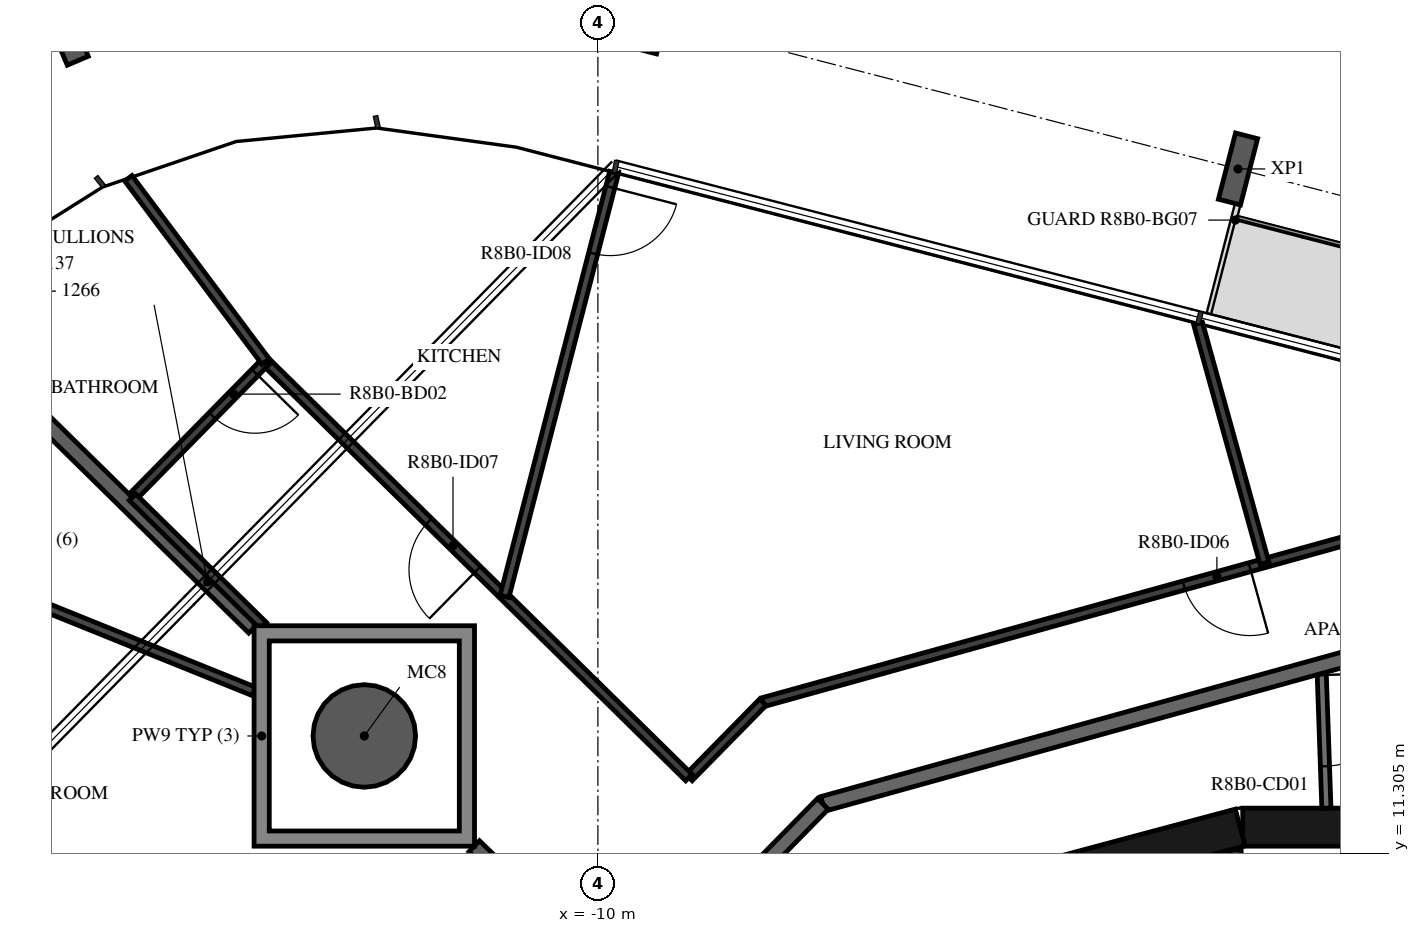
"""IFC4 building model, lengths in metres.
Left out: names, types, materials, properties, quantities, classifications, styles, units other than length and angle.
Written with IfcOpenShell. Run it as: python <this file> out.ifc"""

import sys

from ifc_helpers import new_model, si_unit, direction, frame, frame_2d, origin, origin_2d, place, context, subcontext, project, spatial, polyline, rectangle, hollow_circle, i_section, outline, extrude, element, fill, save


model = new_model("IFC4")
c1 = context("Model", 3, precision=1e-05, world=origin(), true_north=direction((0.0, 1.0)))
c2 = subcontext(c1, "Body", "Model", "MODEL_VIEW")
j1 = project(units=[si_unit("LENGTHUNIT", "METRE"), si_unit("PLANEANGLEUNIT", "RADIAN")], contexts=[c1])
p1 = place(None, origin())
s1 = spatial("IfcSite", under=j1, at=p1, CompositionType="ELEMENT")
p2 = place(p1, origin())
s2 = spatial("IfcBuilding", under=s1, at=p2, CompositionType="ELEMENT")
p3 = place(p2, frame((0.0, 0.0, 312.2)))
s3 = spatial("IfcBuildingStorey", under=s2, at=p3, CompositionType="ELEMENT", Elevation=312.2)
p4 = place(p3, frame((-13.073, 12.847, -0.38), z_axis=(0.0, 0.0, 1.0), x_axis=(1.0, 0.0, 0.0)))
e1 = element("IfcColumn", 1, at=p4, inside=s3, PredefinedType="COLUMN", context=c2, shape_type="SweptSolid", body=[
    extrude(hollow_circle(Radius=0.675, WallThickness=0.03, at=origin_2d()), origin(), (0.0, 0.0, 1.0), 3.5),
])
for number, where, z_axis, x_axis in (
    (2, (-1.579, 20.307, -0.38), (0.0, 0.0, 1.0), (0.968, -0.25, 0.0)),
    (3, (-9.261, 22.293, -0.38), (0.0, 0.0, 1.0), (0.968, -0.25, 0.0)),
    (4, (-17.019, 22.145, -0.38), (0.0, 0.0, 1.0), (0.921, 0.391, 0.0)),
):
    element("IfcColumn", number, at=place(p3, frame(where, z_axis=z_axis, x_axis=x_axis)), inside=s3, PredefinedType="COLUMN", context=c2, shape_type="SweptSolid", body=[
        extrude(i_section(OverallWidth=0.3, OverallDepth=0.9, WebThickness=0.019, FlangeThickness=0.035, FilletRadius=0.03, at=origin_2d()), origin(), (0.0, 0.0, 1.0), 3.5),
    ])
for number, where, z_axis, x_axis in (
    (5, (1.516, 11.647, 0.0), (0.0, 0.0, 1.0), (-1.0, 0.0, 0.0)),
    (6, (-1.55, 11.643, 0.0), (0.0, 0.0, 1.0), (-0.966, -0.259, 0.0)),
):
    element("IfcWall", number, at=place(p3, frame(where, z_axis=z_axis, x_axis=x_axis)), inside=s3, PredefinedType="SHEAR", context=c2, shape_type="SweptSolid", body=[
        extrude(rectangle(XDim=3.033, YDim=0.5, at=frame_2d((1.516, 0.0))), origin(), (0.0, 0.0, 1.0), 3.12),
    ])
p5 = place(p3, frame((-1.555, 8.99, 0.0), z_axis=(0.0, 0.0, 1.0), x_axis=(-0.024125549686, 0.999708936567, 0.0)))
e7 = element("IfcWall", 7, at=p5, inside=s3, PredefinedType="PARTITIONING", context=c2, shape_type="SweptSolid", body=[
    extrude(rectangle(XDim=2.358, YDim=0.15, at=frame_2d((1.179, 0.0))), origin(), (0.0, 0.0, 1.0), 3.12),
])
p6 = place(p5, frame((0.729, 0.0, 0.0)))
e8 = element("IfcOpeningElement", 8, at=p6, cuts=e7, PredefinedType="OPENING", context=c2, shape_type="SweptSolid", body=[
    extrude(rectangle(XDim=0.9, YDim=2.1, at=frame_2d((0.45, 1.05))), frame((0.0, 0.085, 0.0), z_axis=(0.0, -1.0, 0.0), x_axis=(1.0, 0.0, 0.0)), (0.0, 0.0, 1.0), 0.17),
])
p7 = place(p3, frame((-0.481, 13.772, 0.0), z_axis=(0.0, 0.0, 1.0), x_axis=(0.034870071203, -0.999391854146, 0.0)))
e9 = element("IfcWall", 9, at=p7, inside=s3, PredefinedType="PARTITIONING", context=c2, shape_type="SweptSolid", body=[
    extrude(rectangle(XDim=1.876, YDim=0.12, at=frame_2d((0.938, 0.0))), origin(), (0.0, 0.0, 1.0), 3.12),
])
p8 = place(p7, frame((0.125, 0.0, 0.0)))
e10 = element("IfcOpeningElement", 10, at=p8, cuts=e9, PredefinedType="OPENING", context=c2, shape_type="SweptSolid", body=[
    extrude(rectangle(XDim=1.2, YDim=2.1, at=frame_2d((0.6, 1.05))), frame((0.0, 0.07, 0.0), z_axis=(0.0, -1.0, 0.0), x_axis=(1.0, 0.0, 0.0)), (0.0, 0.0, 1.0), 0.14),
])
p9 = place(p3, frame((-0.121, 13.872, 0.0), z_axis=(0.0, 0.0, 1.0), x_axis=(-0.963625960674, -0.267254575108, 0.0)))
e11 = element("IfcWall", 11, at=p9, inside=s3, PredefinedType="STANDARD", context=c2, shape_type="SweptSolid", body=[
    extrude(rectangle(XDim=7.181, YDim=0.2, at=frame_2d((3.591, 0.0))), origin(), (0.0, 0.0, 1.0), 3.12),
])
p10 = place(p3, frame((-7.041, 11.953, 0.0), z_axis=(0.0, 0.0, 1.0), x_axis=(-0.70090916255, -0.713250549143, 0.0)))
e12 = element("IfcWall", 12, at=p10, inside=s3, PredefinedType="STANDARD", context=c2, shape_type="SweptSolid", body=[
    extrude(rectangle(XDim=7.181, YDim=0.2, at=frame_2d((3.59, 0.0))), origin(), (0.0, 0.0, 1.0), 3.12),
])
p11 = place(p10, frame((3.791, 0.0, 0.0)))
e13 = element("IfcOpeningElement", 13, at=p11, cuts=e12, PredefinedType="OPENING", context=c2, shape_type="SweptSolid", body=[
    extrude(rectangle(XDim=1.0, YDim=2.1, at=frame_2d((0.5, 1.05))), frame((0.0, 0.11, 0.0), z_axis=(0.0, -1.0, 0.0), x_axis=(1.0, 0.0, 0.0)), (0.0, 0.0, 1.0), 0.22),
])
p12 = place(p3, frame((-11.627, 11.396, 0.0), z_axis=(0.0, 0.0, 1.0), x_axis=(0.718328882961, -0.695703683981, 0.0)))
e14 = element("IfcWall", 14, at=p12, inside=s3, PredefinedType="STANDARD", context=c2, shape_type="SweptSolid", body=[
    extrude(rectangle(XDim=2.881, YDim=0.2, at=frame_2d((1.44, 0.0))), origin(), (0.0, 0.0, 1.0), 3.12),
])
p13 = place(p3, frame((-18.741, 18.417, 0.0), z_axis=(0.0, 0.0, 1.0), x_axis=(0.713252414586, -0.700907264256, 0.0)))
e15 = element("IfcWall", 15, at=p13, inside=s3, PredefinedType="STANDARD", context=c2, shape_type="SweptSolid", body=[
    extrude(rectangle(XDim=5.913, YDim=0.2, at=frame_2d((2.957, 0.0))), origin(), (0.0, 0.0, 1.0), 3.12),
])
p14 = place(p3, frame((-0.135, 15.425, 0.0), z_axis=(0.0, 0.0, 1.0), x_axis=(-0.963633899075, -0.267225950373, 0.0)))
e16 = element("IfcWall", 16, at=p14, inside=s3, PredefinedType="PARTITIONING", context=c2, shape_type="SweptSolid", body=[
    extrude(rectangle(XDim=7.985, YDim=0.12, at=frame_2d((3.992, 0.0))), origin(), (0.0, 0.0, 1.0), 3.12),
])
p15 = place(p14, frame((1.337, 0.0, 0.0)))
e17 = element("IfcOpeningElement", 17, at=p15, cuts=e16, PredefinedType="OPENING", context=c2, shape_type="SweptSolid", body=[
    extrude(rectangle(XDim=0.9, YDim=2.1, at=frame_2d((0.45, 1.05))), frame((0.0, 0.07, 0.0), z_axis=(0.0, -1.0, 0.0), x_axis=(1.0, 0.0, 0.0)), (0.0, 0.0, 1.0), 0.14),
])
p16 = place(p3, frame((-7.829, 13.291, 0.0), z_axis=(0.0, 0.0, 1.0), x_axis=(-0.700840583087, -0.713317935494, 0.0)))
e18 = element("IfcWall", 18, at=p16, inside=s3, PredefinedType="PARTITIONING", context=c2, shape_type="SweptSolid", body=[
    extrude(rectangle(XDim=1.389, YDim=0.12, at=frame_2d((0.695, 0.0))), origin(), (0.0, 0.0, 1.0), 3.12),
])
p17 = place(p3, frame((-8.803, 12.3, 0.0), z_axis=(0.0, 0.0, 1.0), x_axis=(-0.713240430861, 0.700919458844, 0.0)))
e19 = element("IfcWall", 19, at=p17, inside=s3, PredefinedType="PARTITIONING", context=c2, shape_type="SweptSolid", body=[
    extrude(rectangle(XDim=7.807, YDim=0.12, at=frame_2d((3.904, 0.0))), origin(), (0.0, 0.0, 1.0), 3.12),
])
p18 = place(p17, frame((3.901, 0.0, 0.0)))
e20 = element("IfcOpeningElement", 20, at=p18, cuts=e19, PredefinedType="OPENING", context=c2, shape_type="SweptSolid", body=[
    extrude(rectangle(XDim=0.9, YDim=2.1, at=frame_2d((0.45, 1.05))), frame((0.0, 0.07, 0.0), z_axis=(0.0, -1.0, 0.0), x_axis=(1.0, 0.0, 0.0)), (0.0, 0.0, 1.0), 0.14),
])
p19 = place(p3, frame((-14.371, 17.772, 0.0), z_axis=(0.0, 0.0, 1.0), x_axis=(-0.700928101034, -0.713231937859, 0.0)))
e21 = element("IfcWall", 21, at=p19, inside=s3, PredefinedType="PARTITIONING", context=c2, shape_type="SweptSolid", body=[
    extrude(rectangle(XDim=2.5, YDim=0.12, at=frame_2d((1.25, 0.0))), origin(), (0.0, 0.0, 1.0), 3.12),
])
p20 = place(p19, frame((0.2, 0.0, 0.0)))
e22 = element("IfcOpeningElement", 22, at=p20, cuts=e21, PredefinedType="OPENING", context=c2, shape_type="SweptSolid", body=[
    extrude(rectangle(XDim=0.8, YDim=2.1, at=frame_2d((0.4, 1.05))), frame((0.0, 0.07, 0.0), z_axis=(0.0, -1.0, 0.0), x_axis=(1.0, 0.0, 0.0)), (0.0, 0.0, 1.0), 0.14),
])
p21 = place(p3, frame((-16.124, 15.989, 0.0), z_axis=(0.0, 0.0, 1.0), x_axis=(0.713298294795, -0.700860572898, 0.0)))
e23 = element("IfcWall", 23, at=p21, inside=s3, PredefinedType="PARTITIONING", context=c2, shape_type="SweptSolid", body=[
    extrude(rectangle(XDim=2.414, YDim=0.12, at=frame_2d((1.207, 0.0))), origin(), (0.0, 0.0, 1.0), 3.12),
])
p22 = place(p3, frame((-2.104, 18.273, 0.0), z_axis=(0.0, 0.0, 1.0), x_axis=(0.267251230405, -0.963626888296, 0.0)))
e24 = element("IfcWall", 24, at=p22, inside=s3, PredefinedType="PARTITIONING", context=c2, shape_type="SweptSolid", body=[
    extrude(rectangle(XDim=3.271, YDim=0.12, at=frame_2d((1.636, 0.0))), origin(), (0.0, 0.0, 1.0), 3.12),
])
p23 = place(p3, frame((-9.787, 20.26, 0.0), z_axis=(0.0, 0.0, 1.0), x_axis=(-0.250397207818, -0.968143191019, 0.0)))
e25 = element("IfcWall", 25, at=p23, inside=s3, PredefinedType="PARTITIONING", context=c2, shape_type="SweptSolid", body=[
    extrude(rectangle(XDim=5.76, YDim=0.12, at=frame_2d((2.88, 0.0))), origin(), (0.0, 0.0, 1.0), 2.73),
])
p24 = place(p23, frame((0.2, 0.0, 0.0)))
e26 = element("IfcOpeningElement", 26, at=p24, cuts=e25, PredefinedType="OPENING", context=c2, shape_type="SweptSolid", body=[
    extrude(rectangle(XDim=0.9, YDim=2.1, at=frame_2d((0.45, 1.05))), frame((0.0, 0.07, 0.0), z_axis=(0.0, -1.0, 0.0), x_axis=(1.0, 0.0, 0.0)), (0.0, 0.0, 1.0), 0.14),
])
p25 = place(p3, frame((-16.177, 20.184, 0.0), z_axis=(0.0, 0.0, 1.0), x_axis=(0.599546131574, -0.800340200237, 0.0)))
e27 = element("IfcWall", 27, at=p25, inside=s3, PredefinedType="PARTITIONING", context=c2, shape_type="SweptSolid", body=[
    extrude(rectangle(XDim=3.013, YDim=0.12, at=frame_2d((1.506, 0.0))), origin(), (0.0, 0.0, 1.0), 2.73),
])
p26 = place(p3, frame((-20.46, 15.831, 0.0), z_axis=(0.0, 0.0, 1.0), x_axis=(0.927230380144, -0.374491417977, 0.0)))
e28 = element("IfcWall", 28, at=p26, inside=s3, PredefinedType="PARTITIONING", context=c2, shape_type="SweptSolid", body=[
    extrude(rectangle(XDim=6.403, YDim=0.12, at=frame_2d((3.202, 0.0))), origin(), (0.0, 0.0, 1.0), 2.73),
])
p27 = place(p26, frame((0.2, 0.0, 0.0)))
e29 = element("IfcOpeningElement", 29, at=p27, cuts=e28, PredefinedType="OPENING", context=c2, shape_type="SweptSolid", body=[
    extrude(rectangle(XDim=0.9, YDim=2.1, at=frame_2d((0.45, 1.05))), frame((0.0, 0.07, 0.0), z_axis=(0.0, -1.0, 0.0), x_axis=(1.0, 0.0, 0.0)), (0.0, 0.0, 1.0), 0.14),
])
p28 = place(p3, frame((-21.051, 12.76, 0.0), z_axis=(0.0, 0.0, 1.0), x_axis=(0.826728647395, -0.562600874134, 0.0)))
e30 = element("IfcWall", 30, at=p28, inside=s3, PredefinedType="PARTITIONING", context=c2, shape_type="SweptSolid", body=[
    extrude(rectangle(XDim=7.002, YDim=0.12, at=frame_2d((3.501, 0.0))), origin(), (0.0, 0.0, 1.0), 3.12),
])
p29 = place(p3, origin())
e31 = element("IfcWall", 31, at=p29, inside=s3, PredefinedType="STANDARD", context=c2, shape_type="SweptSolid", body=[
    extrude(outline(polyline([(-11.623, 14.297), (-11.623, 11.397), (-14.523, 11.397), (-14.523, 14.297), (-11.623, 14.297)]), holes=[polyline([(-14.323, 11.597), (-11.823, 11.597), (-11.823, 14.097), (-14.323, 14.097), (-14.323, 11.597)])]), origin(), (0.0, 0.0, 1.0), 3.12),
])
p30 = place(p15, origin())
e32 = element("IfcDoor", 32, at=p30, inside=s3, OperationType="SINGLE_SWING_RIGHT", PredefinedType="DOOR", context=c2, shape_type="SweptSolid", body=[
    extrude(rectangle(XDim=0.9, YDim=2.1, at=frame_2d((0.45, 1.05))), frame((0.0, 0.025, 0.0), z_axis=(0.0, -1.0, 0.0), x_axis=(1.0, 0.0, 0.0)), (0.0, 0.0, 1.0), 0.05),
])
fill(e17, e32)
p31 = place(p18, origin())
e33 = element("IfcDoor", 33, at=p31, inside=s3, OperationType="SINGLE_SWING_LEFT", PredefinedType="DOOR", context=c2, shape_type="SweptSolid", body=[
    extrude(rectangle(XDim=0.9, YDim=2.1, at=frame_2d((0.45, 1.05))), frame((0.0, 0.025, 0.0), z_axis=(0.0, -1.0, 0.0), x_axis=(1.0, 0.0, 0.0)), (0.0, 0.0, 1.0), 0.05),
])
fill(e20, e33)
p32 = place(p20, origin())
e34 = element("IfcDoor", 34, at=p32, inside=s3, OperationType="SINGLE_SWING_RIGHT", PredefinedType="DOOR", context=c2, shape_type="SweptSolid", body=[
    extrude(rectangle(XDim=0.8, YDim=2.1, at=frame_2d((0.4, 1.05))), frame((0.0, 0.025, 0.0), z_axis=(0.0, -1.0, 0.0), x_axis=(1.0, 0.0, 0.0)), (0.0, 0.0, 1.0), 0.05),
])
fill(e22, e34)
p33 = place(p24, origin())
e35 = element("IfcDoor", 35, at=p33, inside=s3, OperationType="SINGLE_SWING_RIGHT", PredefinedType="DOOR", context=c2, shape_type="SweptSolid", body=[
    extrude(rectangle(XDim=0.9, YDim=2.1, at=frame_2d((0.45, 1.05))), frame((0.0, 0.025, 0.0), z_axis=(0.0, -1.0, 0.0), x_axis=(1.0, 0.0, 0.0)), (0.0, 0.0, 1.0), 0.05),
])
fill(e26, e35)
p34 = place(p8, origin())
e36 = element("IfcDoor", 36, at=p34, inside=s3, OperationType="DOUBLE_DOOR_SINGLE_SWING", PredefinedType="DOOR", context=c2, shape_type="SweptSolid", body=[
    extrude(rectangle(XDim=1.2, YDim=2.1, at=frame_2d((0.6, 1.05))), frame((0.0, 0.025, 0.0), z_axis=(0.0, -1.0, 0.0), x_axis=(1.0, 0.0, 0.0)), (0.0, 0.0, 1.0), 0.05),
])
fill(e10, e36)
save(model, sys.argv[1])
